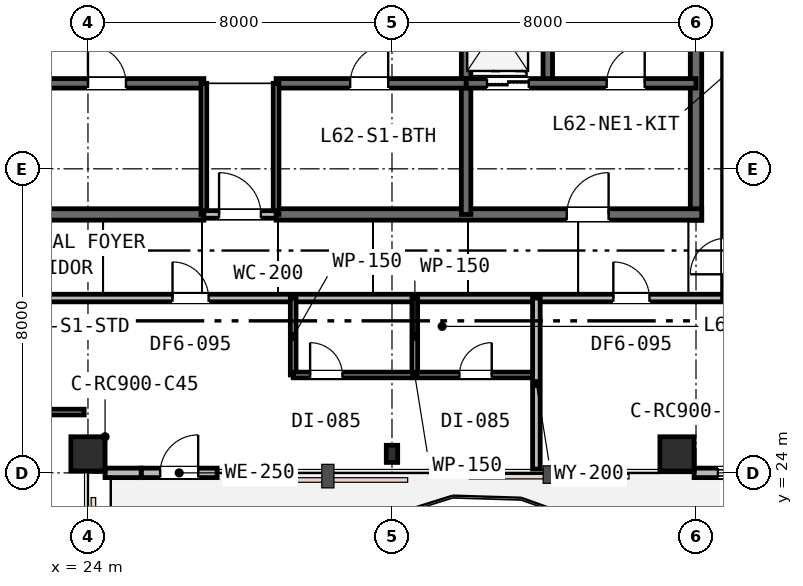
"""IFC4 building model, lengths in metres.
Left out: names, types, materials, properties, quantities, classifications, styles, units other than length and angle.
Written with IfcOpenShell. Run it as: python <this file> out.ifc"""

import sys

from ifc_helpers import new_model, si_unit, direction, frame, frame_2d, origin, origin_2d, place, context, subcontext, project, spatial, rectangle, i_section, extrude, element, fill, save


model = new_model("IFC4")
c1 = context("Model", 3, precision=1e-05, world=origin(), true_north=direction((0.0, 1.0)))
c2 = subcontext(c1, "Body", "Model", "MODEL_VIEW")
j1 = project(units=[si_unit("LENGTHUNIT", "METRE"), si_unit("PLANEANGLEUNIT", "RADIAN")], contexts=[c1])
p1 = place(None, origin())
s1 = spatial("IfcSite", under=j1, at=p1, CompositionType="ELEMENT")
p2 = place(p1, origin())
s2 = spatial("IfcBuilding", under=s1, at=p2, CompositionType="ELEMENT")
p3 = place(p2, frame((0.0, 0.0, 241.2)))
s3 = spatial("IfcBuildingStorey", under=s2, at=p3, CompositionType="ELEMENT", Elevation=241.2)
p4 = place(p3, frame((40.0, 30.65, 0.0), z_axis=(0.0, 0.0, 1.0), x_axis=(0.0, 1.0, 0.0)))
e1 = element("IfcWall", 1, at=p4, inside=s3, PredefinedType="SHEAR", context=c2, shape_type="SweptSolid", body=[
    extrude(rectangle(XDim=12.3, YDim=0.3, at=frame_2d((6.15, 0.0))), origin(), (0.0, 0.0, 1.0), 3.8),
])
p5 = place(p3, frame((15.85, 30.8, 0.0), z_axis=(0.0, 0.0, 1.0), x_axis=(1.0, 0.0, 0.0)))
e2 = element("IfcWall", 2, at=p5, inside=s3, PredefinedType="SHEAR", context=c2, shape_type="SweptSolid", body=[
    extrude(rectangle(XDim=11.2, YDim=0.3, at=frame_2d((5.6, 0.0))), origin(), (0.0, 0.0, 1.0), 3.8),
])
p6 = place(p5, frame((2.45, 0.0, 0.0)))
e3 = element("IfcOpeningElement", 3, at=p6, cuts=e2, PredefinedType="OPENING", context=c2, shape_type="SweptSolid", body=[
    extrude(rectangle(XDim=1.1, YDim=2.15, at=frame_2d((0.55, 1.075))), frame((0.0, 0.16, 0.0), z_axis=(0.0, -1.0, 0.0), x_axis=(1.0, 0.0, 0.0)), (0.0, 0.0, 1.0), 0.32),
])
p7 = place(p3, frame((28.95, 30.8, 0.0), z_axis=(0.0, 0.0, 1.0), x_axis=(1.0, 0.0, 0.0)))
e4 = element("IfcWall", 4, at=p7, inside=s3, PredefinedType="SHEAR", context=c2, shape_type="SweptSolid", body=[
    extrude(rectangle(XDim=11.2, YDim=0.3, at=frame_2d((5.6, 0.0))), origin(), (0.0, 0.0, 1.0), 3.8),
])
p8 = place(p7, frame((7.65, 0.0, 0.0)))
e5 = element("IfcOpeningElement", 5, at=p8, cuts=e4, PredefinedType="OPENING", context=c2, shape_type="SweptSolid", body=[
    extrude(rectangle(XDim=1.1, YDim=2.15, at=frame_2d((0.55, 1.075))), frame((0.0, 0.16, 0.0), z_axis=(0.0, -1.0, 0.0), x_axis=(1.0, 0.0, 0.0)), (0.0, 0.0, 1.0), 0.32),
])
p9 = place(p3, frame((36.1, 34.25, 0.0), z_axis=(0.0, 0.0, 1.0), x_axis=(0.0, 1.0, 0.0)))
e6 = element("IfcWall", 6, at=p9, inside=s3, PredefinedType="SHEAR", context=c2, shape_type="SweptSolid", body=[
    extrude(rectangle(XDim=8.65, YDim=0.25, at=frame_2d((4.325, 0.0))), origin(), (0.0, 0.0, 1.0), 3.8),
])
p10 = place(p3, frame((33.95, 30.8, 0.0), z_axis=(0.0, 0.0, 1.0), x_axis=(0.0, 1.0, 0.0)))
e7 = element("IfcWall", 7, at=p10, inside=s3, PredefinedType="SHEAR", context=c2, shape_type="SweptSolid", body=[
    extrude(rectangle(XDim=6.45, YDim=0.25, at=frame_2d((3.225, 0.0))), origin(), (0.0, 0.0, 1.0), 3.8),
])
p11 = place(p3, frame((33.95, 34.25, 0.0), z_axis=(0.0, 0.0, 1.0), x_axis=(1.0, 0.0, 0.0)))
e8 = element("IfcWall", 8, at=p11, inside=s3, PredefinedType="SHEAR", context=c2, shape_type="SweptSolid", body=[
    extrude(rectangle(XDim=6.05, YDim=0.25, at=frame_2d((3.025, 0.0))), origin(), (0.0, 0.0, 1.0), 3.8),
])
p12 = place(p11, frame((3.7, 0.0, 0.0)))
e9 = element("IfcOpeningElement", 9, at=p12, cuts=e8, PredefinedType="OPENING", context=c2, shape_type="SweptSolid", body=[
    extrude(rectangle(XDim=1.0, YDim=2.15, at=frame_2d((0.5, 1.075))), frame((0.0, 0.135, 0.0), z_axis=(0.0, -1.0, 0.0), x_axis=(1.0, 0.0, 0.0)), (0.0, 0.0, 1.0), 0.27),
])
p13 = place(p11, frame((0.55, 0.0, 0.0)))
e10 = element("IfcOpeningElement", 10, at=p13, cuts=e8, PredefinedType="OPENING", context=c2, shape_type="SweptSolid", body=[
    extrude(rectangle(XDim=1.1, YDim=2.15, at=frame_2d((0.55, 1.075))), frame((0.0, 0.135, 0.0), z_axis=(0.0, -1.0, 0.0), x_axis=(1.0, 0.0, 0.0)), (0.0, 0.0, 1.0), 0.27),
])
p14 = place(p3, frame((22.05, 34.25, 0.0), z_axis=(0.0, 0.0, 1.0), x_axis=(1.0, 0.0, 0.0)))
e11 = element("IfcWall", 11, at=p14, inside=s3, PredefinedType="SHEAR", context=c2, shape_type="SweptSolid", body=[
    extrude(rectangle(XDim=5.0, YDim=0.25, at=frame_2d((2.5, 0.0))), origin(), (0.0, 0.0, 1.0), 3.8),
])
p15 = place(p14, frame((1.95, 0.0, 0.0)))
e12 = element("IfcOpeningElement", 12, at=p15, cuts=e11, PredefinedType="OPENING", context=c2, shape_type="SweptSolid", body=[
    extrude(rectangle(XDim=1.0, YDim=2.15, at=frame_2d((0.5, 1.075))), frame((0.0, 0.135, 0.0), z_axis=(0.0, -1.0, 0.0), x_axis=(1.0, 0.0, 0.0)), (0.0, 0.0, 1.0), 0.27),
])
p16 = place(p3, frame((28.95, 34.25, 0.0), z_axis=(0.0, 0.0, 1.0), x_axis=(1.0, 0.0, 0.0)))
e13 = element("IfcWall", 13, at=p16, inside=s3, PredefinedType="SHEAR", context=c2, shape_type="SweptSolid", body=[
    extrude(rectangle(XDim=5.0, YDim=0.25, at=frame_2d((2.5, 0.0))), origin(), (0.0, 0.0, 1.0), 3.8),
])
p17 = place(p16, frame((1.95, 0.0, 0.0)))
e14 = element("IfcOpeningElement", 14, at=p17, cuts=e13, PredefinedType="OPENING", context=c2, shape_type="SweptSolid", body=[
    extrude(rectangle(XDim=1.0, YDim=2.15, at=frame_2d((0.5, 1.075))), frame((0.0, 0.135, 0.0), z_axis=(0.0, -1.0, 0.0), x_axis=(1.0, 0.0, 0.0)), (0.0, 0.0, 1.0), 0.27),
])
p18 = place(p3, frame((24.0, 24.5, 0.0), z_axis=(0.0, 0.0, 1.0), x_axis=(1.0, 0.0, 0.0)))
e15 = element("IfcColumn", 15, at=p18, inside=s3, PredefinedType="COLUMN", context=c2, shape_type="SweptSolid", body=[
    extrude(rectangle(XDim=0.9, YDim=0.9, at=origin_2d()), origin(), (0.0, 0.0, 1.0), 3.8),
])
p19 = place(p3, frame((32.0, 24.5, 0.0), z_axis=(0.0, 0.0, 1.0), x_axis=(1.0, 0.0, 0.0)))
e16 = element("IfcColumn", 16, at=p19, inside=s3, PredefinedType="COLUMN", context=c2, shape_type="SweptSolid", body=[
    extrude(i_section(OverallWidth=0.3, OverallDepth=0.45, WebThickness=0.014, FlangeThickness=0.026, FilletRadius=0.027, at=origin_2d()), origin(), (0.0, 0.0, 1.0), 3.8),
])
p20 = place(p3, frame((39.5, 24.5, 0.0), z_axis=(0.0, 0.0, 1.0), x_axis=(1.0, 0.0, 0.0)))
e17 = element("IfcColumn", 17, at=p20, inside=s3, PredefinedType="COLUMN", context=c2, shape_type="SweptSolid", body=[
    extrude(rectangle(XDim=0.9, YDim=0.9, at=origin_2d()), origin(), (0.0, 0.0, 1.0), 3.8),
])
p21 = place(p3, frame((25.4, 24.0, 0.0), z_axis=(0.0, 0.0, 1.0), x_axis=(1.0, 0.0, 0.0)))
e18 = element("IfcWall", 18, at=p21, inside=s3, PredefinedType="STANDARD", context=c2, shape_type="SweptSolid", body=[
    extrude(rectangle(XDim=2.0, YDim=0.25, at=frame_2d((1.0, 0.0))), origin(), (0.0, 0.0, 1.0), 3.27),
])
p22 = place(p21, frame((0.5, 0.0, 0.0)))
e19 = element("IfcOpeningElement", 19, at=p22, cuts=e18, PredefinedType="OPENING", context=c2, shape_type="SweptSolid", body=[
    extrude(rectangle(XDim=1.0, YDim=2.15, at=frame_2d((0.5, 1.075))), frame((0.0, 0.135, 0.0), z_axis=(0.0, -1.0, 0.0), x_axis=(1.0, 0.0, 0.0)), (0.0, 0.0, 1.0), 0.27),
])
p23 = place(p3, frame((24.45, 24.0, 0.0), z_axis=(0.0, 0.0, 1.0), x_axis=(1.0, 0.0, 0.0)))
e20 = element("IfcWall", 20, at=p23, inside=s3, PredefinedType="STANDARD", context=c2, shape_type="SweptSolid", body=[
    extrude(rectangle(XDim=0.95, YDim=0.25, at=frame_2d((0.475, 0.0))), origin(), (0.0, 0.0, 1.0), 3.27),
])
p24 = place(p3, frame((39.95, 24.0, 0.0), z_axis=(0.0, 0.0, 1.0), x_axis=(1.0, 0.0, 0.0)))
e21 = element("IfcWall", 21, at=p24, inside=s3, PredefinedType="STANDARD", context=c2, shape_type="SweptSolid", body=[
    extrude(rectangle(XDim=3.05, YDim=0.25, at=frame_2d((1.525, 0.0))), origin(), (0.0, 0.0, 1.0), 3.53),
])
p25 = place(p24, frame((0.625, 0.0, 0.75)))
e22 = element("IfcOpeningElement", 22, at=p25, cuts=e21, PredefinedType="OPENING", context=c2, shape_type="SweptSolid", body=[
    extrude(rectangle(XDim=1.8, YDim=1.85, at=frame_2d((0.9, 0.925))), frame((0.0, 0.135, 0.0), z_axis=(0.0, -1.0, 0.0), x_axis=(1.0, 0.0, 0.0)), (0.0, 0.0, 1.0), 0.27),
])
for number, where, z_axis, x_axis in (
    (23, (27.05, 30.8, 0.0), (0.0, 0.0, 1.0), (0.0, 1.0, 0.0)),
    (24, (28.95, 30.8, 0.0), (0.0, 0.0, 1.0), (0.0, 1.0, 0.0)),
):
    element("IfcWall", number, at=place(p3, frame(where, z_axis=z_axis, x_axis=x_axis)), inside=s3, PredefinedType="PLUMBINGWALL", context=c2, shape_type="SweptSolid", body=[
        extrude(rectangle(XDim=3.45, YDim=0.15, at=frame_2d((1.725, 0.0))), origin(), (0.0, 0.0, 1.0), 3.28),
    ])
p26 = place(p3, frame((27.05, 30.8, 0.0), z_axis=(0.0, 0.0, 1.0), x_axis=(1.0, 0.0, 0.0)))
e25 = element("IfcWall", 25, at=p26, inside=s3, PredefinedType="PARTITIONING", context=c2, shape_type="SweptSolid", body=[
    extrude(rectangle(XDim=1.9, YDim=0.2, at=frame_2d((0.95, 0.0))), origin(), (0.0, 0.0, 1.0), 3.28),
])
p27 = place(p26, frame((0.4, 0.0, 0.0)))
e26 = element("IfcOpeningElement", 26, at=p27, cuts=e25, PredefinedType="OPENING", context=c2, shape_type="SweptSolid", body=[
    extrude(rectangle(XDim=1.1, YDim=2.15, at=frame_2d((0.55, 1.075))), frame((0.0, 0.11, 0.0), z_axis=(0.0, -1.0, 0.0), x_axis=(1.0, 0.0, 0.0)), (0.0, 0.0, 1.0), 0.22),
])
p28 = place(p3, frame((11.6, 28.6, 0.0), z_axis=(0.0, 0.0, 1.0), x_axis=(1.0, 0.0, 0.0)))
e27 = element("IfcWall", 27, at=p28, inside=s3, PredefinedType="PARTITIONING", context=c2, shape_type="SweptSolid", body=[
    extrude(rectangle(XDim=34.3, YDim=0.2, at=frame_2d((17.15, 0.0))), origin(), (0.0, 0.0, 1.0), 3.16),
])
p29 = place(p28, frame((14.625, 0.0, 0.0)))
e28 = element("IfcOpeningElement", 28, at=p29, cuts=e27, PredefinedType="OPENING", context=c2, shape_type="SweptSolid", body=[
    extrude(rectangle(XDim=0.95, YDim=2.15, at=frame_2d((0.475, 1.075))), frame((0.0, 0.11, 0.0), z_axis=(0.0, -1.0, 0.0), x_axis=(1.0, 0.0, 0.0)), (0.0, 0.0, 1.0), 0.22),
])
p30 = place(p28, frame((26.225, 0.0, 0.0)))
e29 = element("IfcOpeningElement", 29, at=p30, cuts=e27, PredefinedType="OPENING", context=c2, shape_type="SweptSolid", body=[
    extrude(rectangle(XDim=0.95, YDim=2.15, at=frame_2d((0.475, 1.075))), frame((0.0, 0.11, 0.0), z_axis=(0.0, -1.0, 0.0), x_axis=(1.0, 0.0, 0.0)), (0.0, 0.0, 1.0), 0.22),
])
p31 = place(p3, frame((40.8, 28.6, 0.0), z_axis=(0.0, 0.0, 1.0), x_axis=(0.0, 1.0, 0.0)))
e30 = element("IfcWall", 30, at=p31, inside=s3, PredefinedType="PARTITIONING", context=c2, shape_type="SweptSolid", body=[
    extrude(rectangle(XDim=14.3, YDim=0.2, at=frame_2d((7.15, 0.0))), origin(), (0.0, 0.0, 1.0), 3.16),
])
p32 = place(p31, frame((0.625, 0.0, 0.0)))
e31 = element("IfcOpeningElement", 31, at=p32, cuts=e30, PredefinedType="OPENING", context=c2, shape_type="SweptSolid", body=[
    extrude(rectangle(XDim=0.95, YDim=2.15, at=frame_2d((0.475, 1.075))), frame((0.0, 0.11, 0.0), z_axis=(0.0, -1.0, 0.0), x_axis=(1.0, 0.0, 0.0)), (0.0, 0.0, 1.0), 0.22),
])
p33 = place(p3, frame((29.4, 26.576, 0.0), z_axis=(0.0, 0.0, 1.0), x_axis=(0.0, 1.0, 0.0)))
e32 = element("IfcWall", 32, at=p33, inside=s3, PredefinedType="PARTITIONING", context=c2, shape_type="SweptSolid", body=[
    extrude(rectangle(XDim=2.024, YDim=0.15, at=frame_2d((1.012, 0.0))), origin(), (0.0, 0.0, 1.0), 3.28),
])
p34 = place(p3, frame((32.6, 26.576, 0.0), z_axis=(0.0, 0.0, 1.0), x_axis=(0.0, 1.0, 0.0)))
e33 = element("IfcWall", 33, at=p34, inside=s3, PredefinedType="PARTITIONING", context=c2, shape_type="SweptSolid", body=[
    extrude(rectangle(XDim=2.024, YDim=0.15, at=frame_2d((1.012, 0.0))), origin(), (0.0, 0.0, 1.0), 3.53),
])
p35 = place(p3, frame((29.4, 26.576, 0.0), z_axis=(0.0, 0.0, 1.0), x_axis=(1.0, 0.0, 0.0)))
e34 = element("IfcWall", 34, at=p35, inside=s3, PredefinedType="PARTITIONING", context=c2, shape_type="SweptSolid", body=[
    extrude(rectangle(XDim=6.4, YDim=0.15, at=frame_2d((3.2, 0.0))), origin(), (0.0, 0.0, 1.0), 3.16),
])
p36 = place(p35, frame((0.445, 0.0, 0.0)))
e35 = element("IfcOpeningElement", 35, at=p36, cuts=e34, PredefinedType="OPENING", context=c2, shape_type="SweptSolid", body=[
    extrude(rectangle(XDim=0.85, YDim=2.15, at=frame_2d((0.425, 1.075))), frame((0.0, 0.085, 0.0), z_axis=(0.0, -1.0, 0.0), x_axis=(1.0, 0.0, 0.0)), (0.0, 0.0, 1.0), 0.17),
])
p37 = place(p35, frame((4.375, 0.0, 0.0)))
e36 = element("IfcOpeningElement", 36, at=p37, cuts=e34, PredefinedType="OPENING", context=c2, shape_type="SweptSolid", body=[
    extrude(rectangle(XDim=0.85, YDim=2.15, at=frame_2d((0.425, 1.075))), frame((0.0, 0.085, 0.0), z_axis=(0.0, -1.0, 0.0), x_axis=(1.0, 0.0, 0.0)), (0.0, 0.0, 1.0), 0.17),
])
p38 = place(p3, frame((35.8, 24.1, 0.0), z_axis=(0.0, 0.0, 1.0), x_axis=(0.0, 1.0, 0.0)))
e37 = element("IfcWall", 37, at=p38, inside=s3, PredefinedType="PARTITIONING", context=c2, shape_type="SweptSolid", body=[
    extrude(rectangle(XDim=4.5, YDim=0.2, at=frame_2d((2.25, 0.0))), origin(), (0.0, 0.0, 1.0), 3.27),
])
p39 = place(p3, frame((11.6, 25.6, 0.0), z_axis=(0.0, 0.0, 1.0), x_axis=(1.0, 0.0, 0.0)))
e38 = element("IfcWall", 38, at=p39, inside=s3, PredefinedType="PARTITIONING", context=c2, shape_type="SweptSolid", body=[
    extrude(rectangle(XDim=12.3, YDim=0.15, at=frame_2d((6.15, 0.0))), origin(), (0.0, 0.0, 1.0), 3.16),
])
p40 = place(p22, origin())
e39 = element("IfcDoor", 39, at=p40, inside=s3, OperationType="SINGLE_SWING_RIGHT", PredefinedType="DOOR", context=c2, shape_type="SweptSolid", body=[
    extrude(rectangle(XDim=1.0, YDim=2.15, at=frame_2d((0.5, 1.075))), frame((0.0, 0.025, 0.0), z_axis=(0.0, -1.0, 0.0), x_axis=(1.0, 0.0, 0.0)), (0.0, 0.0, 1.0), 0.05),
])
fill(e19, e39)
p41 = place(p25, origin())
e40 = element("IfcWindow", 40, at=p41, inside=s3, PartitioningType="SINGLE_PANEL", PredefinedType="WINDOW", context=c2, shape_type="SweptSolid", body=[
    extrude(rectangle(XDim=1.8, YDim=1.85, at=frame_2d((0.9, 0.925))), frame((0.0, 0.03, 0.0), z_axis=(0.0, -1.0, 0.0), x_axis=(1.0, 0.0, 0.0)), (0.0, 0.0, 1.0), 0.06),
])
fill(e22, e40)
p42 = place(p27, origin())
e41 = element("IfcDoor", 41, at=p42, inside=s3, OperationType="SINGLE_SWING_LEFT", PredefinedType="DOOR", context=c2, shape_type="SweptSolid", body=[
    extrude(rectangle(XDim=1.1, YDim=2.15, at=frame_2d((0.55, 1.075))), frame((0.0, 0.025, 0.0), z_axis=(0.0, -1.0, 0.0), x_axis=(1.0, 0.0, 0.0)), (0.0, 0.0, 1.0), 0.05),
])
fill(e26, e41)
p43 = place(p12, origin())
e42 = element("IfcDoor", 42, at=p43, inside=s3, OperationType="SINGLE_SWING_RIGHT", PredefinedType="DOOR", context=c2, shape_type="SweptSolid", body=[
    extrude(rectangle(XDim=1.0, YDim=2.15, at=frame_2d((0.5, 1.075))), frame((0.0, 0.025, 0.0), z_axis=(0.0, -1.0, 0.0), x_axis=(1.0, 0.0, 0.0)), (0.0, 0.0, 1.0), 0.05),
])
fill(e9, e42)
p44 = place(p8, origin())
e43 = element("IfcDoor", 43, at=p44, inside=s3, OperationType="SINGLE_SWING_RIGHT", PredefinedType="DOOR", context=c2, shape_type="SweptSolid", body=[
    extrude(rectangle(XDim=1.1, YDim=2.15, at=frame_2d((0.55, 1.075))), frame((0.0, 0.025, 0.0), z_axis=(0.0, -1.0, 0.0), x_axis=(1.0, 0.0, 0.0)), (0.0, 0.0, 1.0), 0.05),
])
fill(e5, e43)
p45 = place(p15, origin())
e44 = element("IfcDoor", 44, at=p45, inside=s3, OperationType="SINGLE_SWING_LEFT", PredefinedType="DOOR", context=c2, shape_type="SweptSolid", body=[
    extrude(rectangle(XDim=1.0, YDim=2.15, at=frame_2d((0.5, 1.075))), frame((0.0, 0.025, 0.0), z_axis=(0.0, -1.0, 0.0), x_axis=(1.0, 0.0, 0.0)), (0.0, 0.0, 1.0), 0.05),
])
fill(e12, e44)
p46 = place(p17, origin())
e45 = element("IfcDoor", 45, at=p46, inside=s3, OperationType="SINGLE_SWING_RIGHT", PredefinedType="DOOR", context=c2, shape_type="SweptSolid", body=[
    extrude(rectangle(XDim=1.0, YDim=2.15, at=frame_2d((0.5, 1.075))), frame((0.0, 0.025, 0.0), z_axis=(0.0, -1.0, 0.0), x_axis=(1.0, 0.0, 0.0)), (0.0, 0.0, 1.0), 0.05),
])
fill(e14, e45)
p47 = place(p29, origin())
e46 = element("IfcDoor", 46, at=p47, inside=s3, OperationType="SINGLE_SWING_LEFT", PredefinedType="DOOR", context=c2, shape_type="SweptSolid", body=[
    extrude(rectangle(XDim=0.95, YDim=2.15, at=frame_2d((0.475, 1.075))), frame((0.0, 0.025, 0.0), z_axis=(0.0, -1.0, 0.0), x_axis=(1.0, 0.0, 0.0)), (0.0, 0.0, 1.0), 0.05),
])
fill(e28, e46)
p48 = place(p36, origin())
e47 = element("IfcDoor", 47, at=p48, inside=s3, OperationType="SINGLE_SWING_LEFT", PredefinedType="DOOR", context=c2, shape_type="SweptSolid", body=[
    extrude(rectangle(XDim=0.85, YDim=2.15, at=frame_2d((0.425, 1.075))), frame((0.0, 0.025, 0.0), z_axis=(0.0, -1.0, 0.0), x_axis=(1.0, 0.0, 0.0)), (0.0, 0.0, 1.0), 0.05),
])
fill(e35, e47)
p49 = place(p37, origin())
e48 = element("IfcDoor", 48, at=p49, inside=s3, OperationType="SINGLE_SWING_RIGHT", PredefinedType="DOOR", context=c2, shape_type="SweptSolid", body=[
    extrude(rectangle(XDim=0.85, YDim=2.15, at=frame_2d((0.425, 1.075))), frame((0.0, 0.025, 0.0), z_axis=(0.0, -1.0, 0.0), x_axis=(1.0, 0.0, 0.0)), (0.0, 0.0, 1.0), 0.05),
])
fill(e36, e48)
p50 = place(p30, origin())
e49 = element("IfcDoor", 49, at=p50, inside=s3, OperationType="SINGLE_SWING_LEFT", PredefinedType="DOOR", context=c2, shape_type="SweptSolid", body=[
    extrude(rectangle(XDim=0.95, YDim=2.15, at=frame_2d((0.475, 1.075))), frame((0.0, 0.025, 0.0), z_axis=(0.0, -1.0, 0.0), x_axis=(1.0, 0.0, 0.0)), (0.0, 0.0, 1.0), 0.05),
])
fill(e29, e49)
p51 = place(p13, origin())
e50 = element("IfcDoor", 50, at=p51, inside=s3, OperationType="DOUBLE_DOOR_SLIDING", PredefinedType="DOOR", context=c2, shape_type="SweptSolid", body=[
    extrude(rectangle(XDim=1.1, YDim=2.15, at=frame_2d((0.55, 1.075))), frame((0.0, 0.025, 0.0), z_axis=(0.0, -1.0, 0.0), x_axis=(1.0, 0.0, 0.0)), (0.0, 0.0, 1.0), 0.05),
])
fill(e10, e50)
save(model, sys.argv[1])
